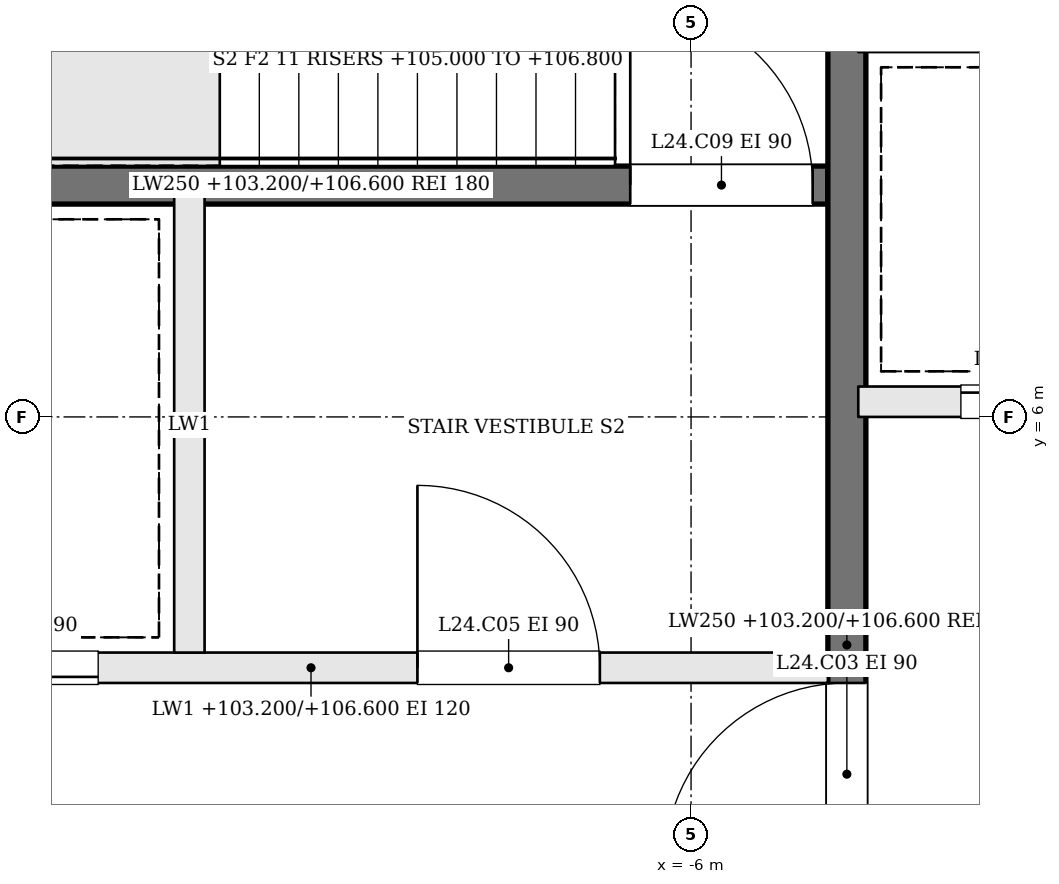
"""IFC4 building model, lengths in metres.
Left out: names, types, materials, properties, quantities, classifications, styles, units other than length and angle.
Written with IfcOpenShell. Run it as: python <this file> out.ifc"""

import sys

from ifc_helpers import new_model, si_unit, direction, frame, frame_2d, origin, place, context, subcontext, project, spatial, rectangle, extrude, element, fill, save


model = new_model("IFC4")
c1 = context("Model", 3, precision=1e-05, world=origin(), true_north=direction((0.0, 1.0)))
c2 = subcontext(c1, "Body", "Model", "MODEL_VIEW")
j1 = project(units=[si_unit("LENGTHUNIT", "METRE"), si_unit("PLANEANGLEUNIT", "RADIAN")], contexts=[c1])
p1 = place(None, origin())
s1 = spatial("IfcSite", under=j1, at=p1, CompositionType="ELEMENT")
p2 = place(p1, origin())
s2 = spatial("IfcBuilding", under=s1, at=p2, CompositionType="ELEMENT")
p3 = place(p2, frame((0.0, 0.0, 103.2)))
s3 = spatial("IfcBuildingStorey", under=s2, at=p3, CompositionType="ELEMENT", Elevation=103.2)
p4 = place(p3, frame((-11.9, 4.35, 0.0), z_axis=(0.0, 0.0, 1.0), x_axis=(1.0, 0.0, 0.0)))
e1 = element("IfcWall", 1, at=p4, inside=s3, PredefinedType="SOLIDWALL", context=c2, shape_type="SweptSolid", body=[
    extrude(rectangle(XDim=6.8, YDim=0.2, at=frame_2d((3.4, 0.0))), origin(), (0.0, 0.0, 1.0), 3.4),
])
p5 = place(p4, frame((4.1, 0.0, 0.0)))
e2 = element("IfcOpeningElement", 2, at=p5, cuts=e1, PredefinedType="OPENING", context=c2, shape_type="SweptSolid", body=[
    extrude(rectangle(XDim=1.2, YDim=2.1, at=frame_2d((0.6, 1.05))), frame((0.0, 0.11, 0.0), z_axis=(0.0, -1.0, 0.0), x_axis=(1.0, 0.0, 0.0)), (0.0, 0.0, 1.0), 0.22),
])
p6 = place(p4, frame((0.8, 0.0, 0.0)))
e3 = element("IfcOpeningElement", 3, at=p6, cuts=e1, PredefinedType="OPENING", context=c2, shape_type="SweptSolid", body=[
    extrude(rectangle(XDim=1.2, YDim=2.1, at=frame_2d((0.6, 1.05))), frame((0.0, 0.11, 0.0), z_axis=(0.0, -1.0, 0.0), x_axis=(1.0, 0.0, 0.0)), (0.0, 0.0, 1.0), 0.22),
])
p7 = place(p3, frame((-11.9, 7.525, 0.0), z_axis=(0.0, 0.0, 1.0), x_axis=(1.0, 0.0, 0.0)))
e4 = element("IfcWall", 4, at=p7, inside=s3, PredefinedType="SOLIDWALL", context=c2, shape_type="SweptSolid", body=[
    extrude(rectangle(XDim=6.8, YDim=0.25, at=frame_2d((3.4, 0.0))), origin(), (0.0, 0.0, 1.0), 3.4),
])
p8 = place(p7, frame((5.5, 0.0, 0.0)))
e5 = element("IfcOpeningElement", 5, at=p8, cuts=e4, PredefinedType="OPENING", context=c2, shape_type="SweptSolid", body=[
    extrude(rectangle(XDim=1.2, YDim=2.1, at=frame_2d((0.6, 1.05))), frame((0.0, 0.135, 0.0), z_axis=(0.0, -1.0, 0.0), x_axis=(1.0, 0.0, 0.0)), (0.0, 0.0, 1.0), 0.27),
])
p9 = place(p3, frame((-9.3, 4.45, 0.0), z_axis=(0.0, 0.0, 1.0), x_axis=(0.0, 1.0, 0.0)))
e6 = element("IfcWall", 6, at=p9, inside=s3, PredefinedType="SOLIDWALL", context=c2, shape_type="SweptSolid", body=[
    extrude(rectangle(XDim=3.0, YDim=0.2, at=frame_2d((1.5, 0.0))), origin(), (0.0, 0.0, 1.0), 3.4),
])
p10 = place(p3, frame((-4.975, -1.9, 0.0), z_axis=(0.0, 0.0, 1.0), x_axis=(0.0, 1.0, 0.0)))
e7 = element("IfcWall", 7, at=p10, inside=s3, PredefinedType="SOLIDWALL", context=c2, shape_type="SweptSolid", body=[
    extrude(rectangle(XDim=12.8, YDim=0.25, at=frame_2d((6.4, 0.0))), origin(), (0.0, 0.0, 1.0), 3.4),
])
p11 = place(p10, frame((4.95, 0.0, 0.0)))
e8 = element("IfcOpeningElement", 8, at=p11, cuts=e7, PredefinedType="OPENING", context=c2, shape_type="SweptSolid", body=[
    extrude(rectangle(XDim=1.2, YDim=2.1, at=frame_2d((0.6, 1.05))), frame((0.0, 0.135, 0.0), z_axis=(0.0, -1.0, 0.0), x_axis=(1.0, 0.0, 0.0)), (0.0, 0.0, 1.0), 0.27),
])
p12 = place(p3, frame((-4.9, 6.1, 0.0), z_axis=(0.0, 0.0, 1.0), x_axis=(1.0, 0.0, 0.0)))
e9 = element("IfcWall", 9, at=p12, inside=s3, PredefinedType="SOLIDWALL", context=c2, shape_type="SweptSolid", body=[
    extrude(rectangle(XDim=9.8, YDim=0.2, at=frame_2d((4.9, 0.0))), origin(), (0.0, 0.0, 1.0), 3.4),
])
p13 = place(p12, frame((0.675, 0.0, 0.0)))
e10 = element("IfcOpeningElement", 10, at=p13, cuts=e9, PredefinedType="OPENING", context=c2, shape_type="SweptSolid", body=[
    extrude(rectangle(XDim=1.1, YDim=2.1, at=frame_2d((0.55, 1.05))), frame((0.0, 0.11, 0.0), z_axis=(0.0, -1.0, 0.0), x_axis=(1.0, 0.0, 0.0)), (0.0, 0.0, 1.0), 0.22),
])
p14 = place(p12, frame((3.125, 0.0, 0.0)))
e11 = element("IfcOpeningElement", 11, at=p14, cuts=e9, PredefinedType="OPENING", context=c2, shape_type="SweptSolid", body=[
    extrude(rectangle(XDim=1.1, YDim=2.1, at=frame_2d((0.55, 1.05))), frame((0.0, 0.11, 0.0), z_axis=(0.0, -1.0, 0.0), x_axis=(1.0, 0.0, 0.0)), (0.0, 0.0, 1.0), 0.22),
])
p15 = place(p12, frame((5.575, 0.0, 0.0)))
e12 = element("IfcOpeningElement", 12, at=p15, cuts=e9, PredefinedType="OPENING", context=c2, shape_type="SweptSolid", body=[
    extrude(rectangle(XDim=1.1, YDim=2.1, at=frame_2d((0.55, 1.05))), frame((0.0, 0.11, 0.0), z_axis=(0.0, -1.0, 0.0), x_axis=(1.0, 0.0, 0.0)), (0.0, 0.0, 1.0), 0.22),
])
p16 = place(p12, frame((8.025, 0.0, 0.0)))
e13 = element("IfcOpeningElement", 13, at=p16, cuts=e9, PredefinedType="OPENING", context=c2, shape_type="SweptSolid", body=[
    extrude(rectangle(XDim=1.1, YDim=2.1, at=frame_2d((0.55, 1.05))), frame((0.0, 0.11, 0.0), z_axis=(0.0, -1.0, 0.0), x_axis=(1.0, 0.0, 0.0)), (0.0, 0.0, 1.0), 0.22),
])
p17 = place(p11, origin())
e14 = element("IfcDoor", 14, at=p17, inside=s3, OperationType="SINGLE_SWING_LEFT", PredefinedType="DOOR", context=c2, shape_type="SweptSolid", body=[
    extrude(rectangle(XDim=1.2, YDim=2.1, at=frame_2d((0.6, 1.05))), frame((0.0, 0.025, 0.0), z_axis=(0.0, -1.0, 0.0), x_axis=(1.0, 0.0, 0.0)), (0.0, 0.0, 1.0), 0.05),
])
fill(e8, e14)
p18 = place(p5, origin())
e15 = element("IfcDoor", 15, at=p18, inside=s3, OperationType="SINGLE_SWING_LEFT", PredefinedType="DOOR", context=c2, shape_type="SweptSolid", body=[
    extrude(rectangle(XDim=1.2, YDim=2.1, at=frame_2d((0.6, 1.05))), frame((0.0, 0.025, 0.0), z_axis=(0.0, -1.0, 0.0), x_axis=(1.0, 0.0, 0.0)), (0.0, 0.0, 1.0), 0.05),
])
fill(e2, e15)
p19 = place(p8, origin())
e16 = element("IfcDoor", 16, at=p19, inside=s3, OperationType="SINGLE_SWING_LEFT", PredefinedType="DOOR", context=c2, shape_type="SweptSolid", body=[
    extrude(rectangle(XDim=1.2, YDim=2.1, at=frame_2d((0.6, 1.05))), frame((0.0, 0.025, 0.0), z_axis=(0.0, -1.0, 0.0), x_axis=(1.0, 0.0, 0.0)), (0.0, 0.0, 1.0), 0.05),
])
fill(e5, e16)
p20 = place(p6, origin())
e17 = element("IfcDoor", 17, at=p20, inside=s3, OperationType="SLIDING_TO_RIGHT", PredefinedType="DOOR", context=c2, shape_type="SweptSolid", body=[
    extrude(rectangle(XDim=1.2, YDim=2.1, at=frame_2d((0.6, 1.05))), frame((0.0, 0.025, 0.0), z_axis=(0.0, -1.0, 0.0), x_axis=(1.0, 0.0, 0.0)), (0.0, 0.0, 1.0), 0.05),
])
fill(e3, e17)
p21 = place(p13, origin())
e18 = element("IfcDoor", 18, at=p21, inside=s3, OperationType="SLIDING_TO_RIGHT", PredefinedType="DOOR", context=c2, shape_type="SweptSolid", body=[
    extrude(rectangle(XDim=1.1, YDim=2.1, at=frame_2d((0.55, 1.05))), frame((0.0, 0.025, 0.0), z_axis=(0.0, -1.0, 0.0), x_axis=(1.0, 0.0, 0.0)), (0.0, 0.0, 1.0), 0.05),
])
fill(e10, e18)
save(model, sys.argv[1])
